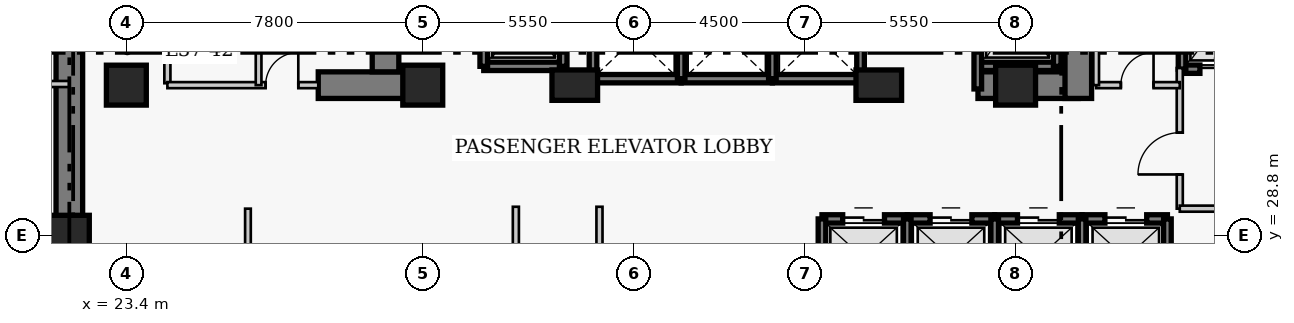
"""IFC4 building model, lengths in metres.
Left out: names, types, materials, properties, quantities, classifications, styles, units other than length and angle.
Written with IfcOpenShell. Run it as: python <this file> out.ifc"""

import sys

from ifc_helpers import new_model, si_unit, direction, frame, frame_2d, origin, origin_2d, place, context, subcontext, project, spatial, rectangle, extrude, element, fill, save


model = new_model("IFC4")
c1 = context("Model", 3, precision=1e-05, world=origin(), true_north=direction((0.0, 1.0)))
c2 = subcontext(c1, "Body", "Model", "MODEL_VIEW")
j1 = project(units=[si_unit("LENGTHUNIT", "METRE"), si_unit("PLANEANGLEUNIT", "RADIAN")], contexts=[c1])
p1 = place(None, origin())
s1 = spatial("IfcSite", under=j1, at=p1, CompositionType="ELEMENT")
p2 = place(p1, origin())
s2 = spatial("IfcBuilding", under=s1, at=p2, CompositionType="ELEMENT")
p3 = place(p2, frame((0.0, 0.0, 149.8)))
s3 = spatial("IfcBuildingStorey", under=s2, at=p3, CompositionType="ELEMENT", Elevation=149.8)
p4 = place(p3, frame((21.9, 27.05, 0.0), z_axis=(0.0, 0.0, 1.0), x_axis=(0.0, 1.0, 0.0)))
e1 = element("IfcWall", 1, at=p4, inside=s3, PredefinedType="SHEAR", context=c2, shape_type="SweptSolid", body=[
    extrude(rectangle(XDim=13.62, YDim=0.7, at=frame_2d((6.81, 0.0))), origin(), (0.0, 0.0, 1.0), 3.8),
])
p5 = place(p3, frame((28.45, 32.75, 0.0), z_axis=(0.0, 0.0, 1.0), x_axis=(1.0, 0.0, 0.0)))
e2 = element("IfcWall", 2, at=p5, inside=s3, PredefinedType="SHEAR", context=c2, shape_type="SweptSolid", body=[
    extrude(rectangle(XDim=2.4, YDim=0.7, at=frame_2d((1.2, 0.0))), origin(), (0.0, 0.0, 1.0), 3.8),
])
p6 = place(p3, frame((45.81, 32.75, 0.0), z_axis=(0.0, 0.0, 1.0), x_axis=(1.0, 0.0, 0.0)))
e3 = element("IfcWall", 3, at=p6, inside=s3, PredefinedType="SHEAR", context=c2, shape_type="SweptSolid", body=[
    extrude(rectangle(XDim=2.64, YDim=0.7, at=frame_2d((1.32, 0.0))), origin(), (0.0, 0.0, 1.0), 3.8),
])
p7 = place(p3, frame((30.22, 33.1, 0.0), z_axis=(0.0, 0.0, 1.0), x_axis=(0.0, 1.0, 0.0)))
e4 = element("IfcWall", 4, at=p7, inside=s3, PredefinedType="SHEAR", context=c2, shape_type="SweptSolid", body=[
    extrude(rectangle(XDim=7.22, YDim=0.7, at=frame_2d((3.61, 0.0))), origin(), (0.0, 0.0, 1.0), 3.8),
])
p8 = place(p3, frame((48.45, 32.4, 0.0), z_axis=(0.0, 0.0, 1.0), x_axis=(0.0, 1.0, 0.0)))
e5 = element("IfcWall", 5, at=p8, inside=s3, PredefinedType="SHEAR", context=c2, shape_type="SweptSolid", body=[
    extrude(rectangle(XDim=7.92, YDim=0.7, at=frame_2d((3.96, 0.0))), origin(), (0.0, 0.0, 1.0), 3.8),
])
p9 = place(p8, frame((5.8, 0.0, 0.0)))
e6 = element("IfcOpeningElement", 6, at=p9, cuts=e5, PredefinedType="OPENING", context=c2, shape_type="SweptSolid", body=[
    extrude(rectangle(XDim=1.1, YDim=2.15, at=frame_2d((0.55, 1.075))), frame((0.0, 0.36, 0.0), z_axis=(0.0, -1.0, 0.0), x_axis=(1.0, 0.0, 0.0)), (0.0, 0.0, 1.0), 0.72),
])
for number, where, z_axis, x_axis in (
    (7, (21.9, 28.8, 0.0), (0.0, 0.0, 1.0), (1.0, 0.0, 0.0)),
    (8, (23.4, 32.75, 0.0), (0.0, 0.0, 1.0), (1.0, 0.0, 0.0)),
    (9, (31.2, 32.75, 0.0), (0.0, 0.0, 1.0), (1.0, 0.0, 0.0)),
):
    element("IfcColumn", number, at=place(p3, frame(where, z_axis=z_axis, x_axis=x_axis)), inside=s3, PredefinedType="COLUMN", context=c2, shape_type="SweptSolid", body=[
        extrude(rectangle(XDim=1.05, YDim=1.05, at=origin_2d()), origin(), (0.0, 0.0, 1.0), 3.8),
    ])
for number, where, z_axis, x_axis in (
    (10, (35.2, 32.75, 0.0), (0.0, 0.0, 1.0), (1.0, 0.0, 0.0)),
    (11, (43.2, 32.75, 0.0), (0.0, 0.0, 1.0), (1.0, 0.0, 0.0)),
):
    element("IfcColumn", number, at=place(p3, frame(where, z_axis=z_axis, x_axis=x_axis)), inside=s3, PredefinedType="COLUMN", context=c2, shape_type="SweptSolid", body=[
        extrude(rectangle(XDim=1.2, YDim=0.8, at=origin_2d()), origin(), (0.0, 0.0, 1.0), 3.8),
    ])
p10 = place(p3, frame((46.8, 32.75, 0.0), z_axis=(0.0, 0.0, 1.0), x_axis=(1.0, 0.0, 0.0)))
e12 = element("IfcColumn", 12, at=p10, inside=s3, PredefinedType="COLUMN", context=c2, shape_type="SweptSolid", body=[
    extrude(rectangle(XDim=1.05, YDim=1.05, at=origin_2d()), origin(), (0.0, 0.0, 1.0), 3.8),
])
p11 = place(p3, frame((41.705, 29.23, 0.0), z_axis=(0.0, 0.0, 1.0), x_axis=(1.0, 0.0, 0.0)))
e13 = element("IfcWall", 13, at=p11, inside=s3, PredefinedType="SHEAR", context=c2, shape_type="SweptSolid", body=[
    extrude(rectangle(XDim=2.245, YDim=0.22, at=frame_2d((1.123, 0.0))), origin(), (0.0, 0.0, 1.0), 3.8),
])
p12 = place(p11, frame((0.545, 0.0, 0.0)))
e14 = element("IfcOpeningElement", 14, at=p12, cuts=e13, PredefinedType="OPENING", context=c2, shape_type="SweptSolid", body=[
    extrude(rectangle(XDim=1.1, YDim=2.15, at=frame_2d((0.55, 1.075))), frame((0.0, 0.12, 0.0), z_axis=(0.0, -1.0, 0.0), x_axis=(1.0, 0.0, 0.0)), (0.0, 0.0, 1.0), 0.24),
])
p13 = place(p3, frame((41.705, 27.17, 0.0), z_axis=(0.0, 0.0, 1.0), x_axis=(0.0, 1.0, 0.0)))
e15 = element("IfcWall", 15, at=p13, inside=s3, PredefinedType="SHEAR", context=c2, shape_type="SweptSolid", body=[
    extrude(rectangle(XDim=2.06, YDim=0.2, at=frame_2d((1.03, 0.0))), origin(), (0.0, 0.0, 1.0), 3.8),
])
p14 = place(p3, frame((43.95, 29.23, 0.0), z_axis=(0.0, 0.0, 1.0), x_axis=(1.0, 0.0, 0.0)))
e16 = element("IfcWall", 16, at=p14, inside=s3, PredefinedType="SHEAR", context=c2, shape_type="SweptSolid", body=[
    extrude(rectangle(XDim=2.3, YDim=0.22, at=frame_2d((1.15, 0.0))), origin(), (0.0, 0.0, 1.0), 3.8),
])
p15 = place(p14, frame((0.6, 0.0, 0.0)))
e17 = element("IfcOpeningElement", 17, at=p15, cuts=e16, PredefinedType="OPENING", context=c2, shape_type="SweptSolid", body=[
    extrude(rectangle(XDim=1.1, YDim=2.15, at=frame_2d((0.55, 1.075))), frame((0.0, 0.12, 0.0), z_axis=(0.0, -1.0, 0.0), x_axis=(1.0, 0.0, 0.0)), (0.0, 0.0, 1.0), 0.24),
])
p16 = place(p3, frame((43.95, 27.17, 0.0), z_axis=(0.0, 0.0, 1.0), x_axis=(0.0, 1.0, 0.0)))
e18 = element("IfcWall", 18, at=p16, inside=s3, PredefinedType="SHEAR", context=c2, shape_type="SweptSolid", body=[
    extrude(rectangle(XDim=2.06, YDim=0.2, at=frame_2d((1.03, 0.0))), origin(), (0.0, 0.0, 1.0), 3.8),
])
p17 = place(p3, frame((46.25, 29.23, 0.0), z_axis=(0.0, 0.0, 1.0), x_axis=(1.0, 0.0, 0.0)))
e19 = element("IfcWall", 19, at=p17, inside=s3, PredefinedType="SHEAR", context=c2, shape_type="SweptSolid", body=[
    extrude(rectangle(XDim=2.3, YDim=0.22, at=frame_2d((1.15, 0.0))), origin(), (0.0, 0.0, 1.0), 3.8),
])
p18 = place(p17, frame((0.6, 0.0, 0.0)))
e20 = element("IfcOpeningElement", 20, at=p18, cuts=e19, PredefinedType="OPENING", context=c2, shape_type="SweptSolid", body=[
    extrude(rectangle(XDim=1.1, YDim=2.15, at=frame_2d((0.55, 1.075))), frame((0.0, 0.12, 0.0), z_axis=(0.0, -1.0, 0.0), x_axis=(1.0, 0.0, 0.0)), (0.0, 0.0, 1.0), 0.24),
])
p19 = place(p3, frame((46.25, 27.17, 0.0), z_axis=(0.0, 0.0, 1.0), x_axis=(0.0, 1.0, 0.0)))
e21 = element("IfcWall", 21, at=p19, inside=s3, PredefinedType="SHEAR", context=c2, shape_type="SweptSolid", body=[
    extrude(rectangle(XDim=2.06, YDim=0.2, at=frame_2d((1.03, 0.0))), origin(), (0.0, 0.0, 1.0), 3.8),
])
p20 = place(p3, frame((48.55, 29.23, 0.0), z_axis=(0.0, 0.0, 1.0), x_axis=(1.0, 0.0, 0.0)))
e22 = element("IfcWall", 22, at=p20, inside=s3, PredefinedType="SHEAR", context=c2, shape_type="SweptSolid", body=[
    extrude(rectangle(XDim=2.245, YDim=0.22, at=frame_2d((1.123, 0.0))), origin(), (0.0, 0.0, 1.0), 3.8),
])
p21 = place(p20, frame((0.6, 0.0, 0.0)))
e23 = element("IfcOpeningElement", 23, at=p21, cuts=e22, PredefinedType="OPENING", context=c2, shape_type="SweptSolid", body=[
    extrude(rectangle(XDim=1.1, YDim=2.15, at=frame_2d((0.55, 1.075))), frame((0.0, 0.12, 0.0), z_axis=(0.0, -1.0, 0.0), x_axis=(1.0, 0.0, 0.0)), (0.0, 0.0, 1.0), 0.24),
])
for number, where, z_axis, x_axis in (
    (24, (48.55, 27.17, 0.0), (0.0, 0.0, 1.0), (0.0, 1.0, 0.0)),
    (25, (50.795, 27.17, 0.0), (0.0, 0.0, 1.0), (0.0, 1.0, 0.0)),
):
    element("IfcWall", number, at=place(p3, frame(where, z_axis=z_axis, x_axis=x_axis)), inside=s3, PredefinedType="SHEAR", context=c2, shape_type="SweptSolid", body=[
        extrude(rectangle(XDim=2.06, YDim=0.2, at=frame_2d((1.03, 0.0))), origin(), (0.0, 0.0, 1.0), 3.8),
    ])
p22 = place(p3, frame((35.68, 32.92, 0.0), z_axis=(0.0, 0.0, 1.0), x_axis=(1.0, 0.0, 0.0)))
e26 = element("IfcWall", 26, at=p22, inside=s3, PredefinedType="SHEAR", context=c2, shape_type="SweptSolid", body=[
    extrude(rectangle(XDim=2.32, YDim=0.22, at=frame_2d((1.16, 0.0))), origin(), (0.0, 0.0, 1.0), 3.8),
])
p23 = place(p3, frame((35.68, 32.92, 0.0), z_axis=(0.0, 0.0, 1.0), x_axis=(0.0, 1.0, 0.0)))
e27 = element("IfcWall", 27, at=p23, inside=s3, PredefinedType="SHEAR", context=c2, shape_type="SweptSolid", body=[
    extrude(rectangle(XDim=2.16, YDim=0.2, at=frame_2d((1.08, 0.0))), origin(), (0.0, 0.0, 1.0), 3.8),
])
p24 = place(p3, frame((38.0, 32.92, 0.0), z_axis=(0.0, 0.0, 1.0), x_axis=(1.0, 0.0, 0.0)))
e28 = element("IfcWall", 28, at=p24, inside=s3, PredefinedType="SHEAR", context=c2, shape_type="SweptSolid", body=[
    extrude(rectangle(XDim=2.4, YDim=0.22, at=frame_2d((1.2, 0.0))), origin(), (0.0, 0.0, 1.0), 3.8),
])
p25 = place(p3, frame((38.0, 32.92, 0.0), z_axis=(0.0, 0.0, 1.0), x_axis=(0.0, 1.0, 0.0)))
e29 = element("IfcWall", 29, at=p25, inside=s3, PredefinedType="SHEAR", context=c2, shape_type="SweptSolid", body=[
    extrude(rectangle(XDim=2.16, YDim=0.2, at=frame_2d((1.08, 0.0))), origin(), (0.0, 0.0, 1.0), 3.8),
])
p26 = place(p3, frame((40.4, 32.92, 0.0), z_axis=(0.0, 0.0, 1.0), x_axis=(1.0, 0.0, 0.0)))
e30 = element("IfcWall", 30, at=p26, inside=s3, PredefinedType="SHEAR", context=c2, shape_type="SweptSolid", body=[
    extrude(rectangle(XDim=2.32, YDim=0.22, at=frame_2d((1.16, 0.0))), origin(), (0.0, 0.0, 1.0), 3.8),
])
for number, where, z_axis, x_axis in (
    (31, (40.4, 32.92, 0.0), (0.0, 0.0, 1.0), (0.0, 1.0, 0.0)),
    (32, (42.72, 32.92, 0.0), (0.0, 0.0, 1.0), (0.0, 1.0, 0.0)),
):
    element("IfcWall", number, at=place(p3, frame(where, z_axis=z_axis, x_axis=x_axis)), inside=s3, PredefinedType="SHEAR", context=c2, shape_type="SweptSolid", body=[
        extrude(rectangle(XDim=2.16, YDim=0.2, at=frame_2d((1.08, 0.0))), origin(), (0.0, 0.0, 1.0), 3.8),
    ])
p27 = place(p3, frame((51.18, 33.17, 0.0), z_axis=(0.0, 0.0, 1.0), x_axis=(1.0, 0.0, 0.0)))
e33 = element("IfcWall", 33, at=p27, inside=s3, PredefinedType="SHEAR", context=c2, shape_type="SweptSolid", body=[
    extrude(rectangle(XDim=2.42, YDim=0.22, at=frame_2d((1.21, 0.0))), origin(), (0.0, 0.0, 1.0), 3.8),
])
p28 = place(p27, frame((0.47, 0.0, 0.0)))
e34 = element("IfcOpeningElement", 34, at=p28, cuts=e33, PredefinedType="OPENING", context=c2, shape_type="SweptSolid", body=[
    extrude(rectangle(XDim=1.3, YDim=2.15, at=frame_2d((0.65, 1.075))), frame((0.0, 0.12, 0.0), z_axis=(0.0, -1.0, 0.0), x_axis=(1.0, 0.0, 0.0)), (0.0, 0.0, 1.0), 0.24),
])
p29 = place(p3, frame((51.18, 33.17, 0.0), z_axis=(0.0, 0.0, 1.0), x_axis=(0.0, 1.0, 0.0)))
e35 = element("IfcWall", 35, at=p29, inside=s3, PredefinedType="SHEAR", context=c2, shape_type="SweptSolid", body=[
    extrude(rectangle(XDim=2.86, YDim=0.2, at=frame_2d((1.43, 0.0))), origin(), (0.0, 0.0, 1.0), 3.8),
])
p30 = place(p3, frame((32.805, 33.245, 0.0), z_axis=(0.0, 0.0, 1.0), x_axis=(1.0, 0.0, 0.0)))
e36 = element("IfcWall", 36, at=p30, inside=s3, PredefinedType="SHEAR", context=c2, shape_type="SweptSolid", body=[
    extrude(rectangle(XDim=2.09, YDim=0.22, at=frame_2d((1.045, 0.0))), origin(), (0.0, 0.0, 1.0), 3.8),
])
for number, where, z_axis, x_axis in (
    (37, (32.805, 33.245, 0.0), (0.0, 0.0, 1.0), (0.0, 1.0, 0.0)),
    (38, (34.895, 33.245, 0.0), (0.0, 0.0, 1.0), (0.0, 1.0, 0.0)),
):
    element("IfcWall", number, at=place(p3, frame(where, z_axis=z_axis, x_axis=x_axis)), inside=s3, PredefinedType="SHEAR", context=c2, shape_type="SweptSolid", body=[
        extrude(rectangle(XDim=2.91, YDim=0.2, at=frame_2d((1.455, 0.0))), origin(), (0.0, 0.0, 1.0), 3.8),
    ])
p31 = place(p3, frame((45.805, 33.245, 0.0), z_axis=(0.0, 0.0, 1.0), x_axis=(1.0, 0.0, 0.0)))
e39 = element("IfcWall", 39, at=p31, inside=s3, PredefinedType="SHEAR", context=c2, shape_type="SweptSolid", body=[
    extrude(rectangle(XDim=2.09, YDim=0.22, at=frame_2d((1.045, 0.0))), origin(), (0.0, 0.0, 1.0), 3.8),
])
p32 = place(p3, frame((45.805, 32.65, 0.0), z_axis=(0.0, 0.0, 1.0), x_axis=(0.0, 1.0, 0.0)))
e40 = element("IfcWall", 40, at=p32, inside=s3, PredefinedType="SHEAR", context=c2, shape_type="SweptSolid", body=[
    extrude(rectangle(XDim=3.505, YDim=0.2, at=frame_2d((1.752, 0.0))), origin(), (0.0, 0.0, 1.0), 3.8),
])
p33 = place(p3, frame((47.895, 33.245, 0.0), z_axis=(0.0, 0.0, 1.0), x_axis=(0.0, 1.0, 0.0)))
e41 = element("IfcWall", 41, at=p33, inside=s3, PredefinedType="SHEAR", context=c2, shape_type="SweptSolid", body=[
    extrude(rectangle(XDim=2.91, YDim=0.2, at=frame_2d((1.455, 0.0))), origin(), (0.0, 0.0, 1.0), 3.8),
])
p34 = place(p3, frame((24.48, 32.8, 0.0), z_axis=(0.0, 0.0, 1.0), x_axis=(0.0, 1.0, 0.0)))
e42 = element("IfcWall", 42, at=p34, inside=s3, PredefinedType="PARTITIONING", context=c2, shape_type="SweptSolid", body=[
    extrude(rectangle(XDim=3.57, YDim=0.16, at=frame_2d((1.785, 0.0))), origin(), (0.0, 0.0, 1.0), 3.55),
])
p35 = place(p34, frame((1.604, 0.0, 0.0)))
e43 = element("IfcOpeningElement", 43, at=p35, cuts=e42, PredefinedType="OPENING", context=c2, shape_type="SweptSolid", body=[
    extrude(rectangle(XDim=0.9, YDim=2.1, at=frame_2d((0.45, 1.05))), frame((0.0, 0.09, 0.0), z_axis=(0.0, -1.0, 0.0), x_axis=(1.0, 0.0, 0.0)), (0.0, 0.0, 1.0), 0.18),
])
p36 = place(p3, frame((51.12, 29.5, 0.0), z_axis=(0.0, 0.0, 1.0), x_axis=(0.0, 1.0, 0.0)))
e44 = element("IfcWall", 44, at=p36, inside=s3, PredefinedType="PARTITIONING", context=c2, shape_type="SweptSolid", body=[
    extrude(rectangle(XDim=3.7, YDim=0.16, at=frame_2d((1.85, 0.0))), origin(), (0.0, 0.0, 1.0), 3.55),
])
p37 = place(p36, frame((0.9, 0.0, 0.0)))
e45 = element("IfcOpeningElement", 45, at=p37, cuts=e44, PredefinedType="OPENING", context=c2, shape_type="SweptSolid", body=[
    extrude(rectangle(XDim=1.1, YDim=2.15, at=frame_2d((0.55, 1.075))), frame((0.0, 0.09, 0.0), z_axis=(0.0, -1.0, 0.0), x_axis=(1.0, 0.0, 0.0)), (0.0, 0.0, 1.0), 0.18),
])
p38 = place(p3, frame((51.12, 29.5, 0.0), z_axis=(0.0, 0.0, 1.0), x_axis=(1.0, 0.0, 0.0)))
e46 = element("IfcWall", 46, at=p38, inside=s3, PredefinedType="PARTITIONING", context=c2, shape_type="SweptSolid", body=[
    extrude(rectangle(XDim=5.63, YDim=0.16, at=frame_2d((2.815, 0.0))), origin(), (0.0, 0.0, 1.0), 3.55),
])
p39 = place(p3, frame((24.48, 32.75, 0.0), z_axis=(0.0, 0.0, 1.0), x_axis=(1.0, 0.0, 0.0)))
e47 = element("IfcWall", 47, at=p39, inside=s3, PredefinedType="PARTITIONING", context=c2, shape_type="SweptSolid", body=[
    extrude(rectangle(XDim=3.97, YDim=0.16, at=frame_2d((1.985, 0.0))), origin(), (0.0, 0.0, 1.0), 3.55),
])
p40 = place(p39, frame((2.585, 0.0, 0.0)))
e48 = element("IfcOpeningElement", 48, at=p40, cuts=e47, PredefinedType="OPENING", context=c2, shape_type="SweptSolid", body=[
    extrude(rectangle(XDim=0.86, YDim=2.05, at=frame_2d((0.43, 1.025))), frame((0.0, 0.09, 0.0), z_axis=(0.0, -1.0, 0.0), x_axis=(1.0, 0.0, 0.0)), (0.0, 0.0, 1.0), 0.18),
])
p41 = place(p3, frame((48.92, 32.75, 0.0), z_axis=(0.0, 0.0, 1.0), x_axis=(1.0, 0.0, 0.0)))
e49 = element("IfcWall", 49, at=p41, inside=s3, PredefinedType="PARTITIONING", context=c2, shape_type="SweptSolid", body=[
    extrude(rectangle(XDim=2.2, YDim=0.16, at=frame_2d((1.1, 0.0))), origin(), (0.0, 0.0, 1.0), 3.55),
])
p42 = place(p41, frame((0.65, 0.0, 0.0)))
e50 = element("IfcOpeningElement", 50, at=p42, cuts=e49, PredefinedType="OPENING", context=c2, shape_type="SweptSolid", body=[
    extrude(rectangle(XDim=0.86, YDim=2.05, at=frame_2d((0.43, 1.025))), frame((0.0, 0.09, 0.0), z_axis=(0.0, -1.0, 0.0), x_axis=(1.0, 0.0, 0.0)), (0.0, 0.0, 1.0), 0.18),
])
for number, where, z_axis, x_axis in (
    (51, (48.92, 32.75, 0.0), (0.0, 0.0, 1.0), (0.0, 1.0, 0.0)),
    (52, (26.88, 32.75, 0.0), (0.0, 0.0, 1.0), (0.0, 1.0, 0.0)),
):
    element("IfcWall", number, at=place(p3, frame(where, z_axis=z_axis, x_axis=x_axis)), inside=s3, PredefinedType="PARTITIONING", context=c2, shape_type="SweptSolid", body=[
        extrude(rectangle(XDim=3.62, YDim=0.15, at=frame_2d((1.81, 0.0))), origin(), (0.0, 0.0, 1.0), 3.55),
    ])
for number, where, z_axis, x_axis in (
    (53, (33.65, 17.96, 0.0), (0.0, 0.0, 1.0), (0.0, 1.0, 0.0)),
    (54, (35.85, 17.96, 0.0), (0.0, 0.0, 1.0), (0.0, 1.0, 0.0)),
):
    element("IfcWall", number, at=place(p3, frame(where, z_axis=z_axis, x_axis=x_axis)), inside=s3, PredefinedType="PARTITIONING", context=c2, shape_type="SweptSolid", body=[
        extrude(rectangle(XDim=11.59, YDim=0.16, at=frame_2d((5.795, 0.0))), origin(), (0.0, 0.0, 1.0), 3.55),
    ])
p43 = place(p3, frame((18.86, 32.78, 0.0), z_axis=(0.0, 0.0, 1.0), x_axis=(1.0, 0.0, 0.0)))
e55 = element("IfcWall", 55, at=p43, inside=s3, PredefinedType="PARTITIONING", context=c2, shape_type="SweptSolid", body=[
    extrude(rectangle(XDim=3.04, YDim=0.16, at=frame_2d((1.52, 0.0))), origin(), (0.0, 0.0, 1.0), 3.55),
])
p44 = place(p3, frame((26.6, 17.96, 0.0), z_axis=(0.0, 0.0, 1.0), x_axis=(0.0, 1.0, 0.0)))
e56 = element("IfcWall", 56, at=p44, inside=s3, PredefinedType="PARTITIONING", context=c2, shape_type="SweptSolid", body=[
    extrude(rectangle(XDim=11.54, YDim=0.15, at=frame_2d((5.77, 0.0))), origin(), (0.0, 0.0, 1.0), 3.55),
])
p45 = place(p12, origin())
e57 = element("IfcDoor", 57, at=p45, inside=s3, OperationType="DOUBLE_DOOR_SLIDING", PredefinedType="DOOR", context=c2, shape_type="SweptSolid", body=[
    extrude(rectangle(XDim=1.1, YDim=2.15, at=frame_2d((0.55, 1.075))), frame((0.0, 0.025, 0.0), z_axis=(0.0, -1.0, 0.0), x_axis=(1.0, 0.0, 0.0)), (0.0, 0.0, 1.0), 0.05),
])
fill(e14, e57)
p46 = place(p15, origin())
e58 = element("IfcDoor", 58, at=p46, inside=s3, OperationType="DOUBLE_DOOR_SLIDING", PredefinedType="DOOR", context=c2, shape_type="SweptSolid", body=[
    extrude(rectangle(XDim=1.1, YDim=2.15, at=frame_2d((0.55, 1.075))), frame((0.0, 0.025, 0.0), z_axis=(0.0, -1.0, 0.0), x_axis=(1.0, 0.0, 0.0)), (0.0, 0.0, 1.0), 0.05),
])
fill(e17, e58)
p47 = place(p18, origin())
e59 = element("IfcDoor", 59, at=p47, inside=s3, OperationType="DOUBLE_DOOR_SLIDING", PredefinedType="DOOR", context=c2, shape_type="SweptSolid", body=[
    extrude(rectangle(XDim=1.1, YDim=2.15, at=frame_2d((0.55, 1.075))), frame((0.0, 0.025, 0.0), z_axis=(0.0, -1.0, 0.0), x_axis=(1.0, 0.0, 0.0)), (0.0, 0.0, 1.0), 0.05),
])
fill(e20, e59)
p48 = place(p21, origin())
e60 = element("IfcDoor", 60, at=p48, inside=s3, OperationType="DOUBLE_DOOR_SLIDING", PredefinedType="DOOR", context=c2, shape_type="SweptSolid", body=[
    extrude(rectangle(XDim=1.1, YDim=2.15, at=frame_2d((0.55, 1.075))), frame((0.0, 0.025, 0.0), z_axis=(0.0, -1.0, 0.0), x_axis=(1.0, 0.0, 0.0)), (0.0, 0.0, 1.0), 0.05),
])
fill(e23, e60)
p49 = place(p28, origin())
e61 = element("IfcDoor", 61, at=p49, inside=s3, OperationType="DOUBLE_DOOR_SLIDING", PredefinedType="DOOR", context=c2, shape_type="SweptSolid", body=[
    extrude(rectangle(XDim=1.3, YDim=2.15, at=frame_2d((0.65, 1.075))), frame((0.0, 0.025, 0.0), z_axis=(0.0, -1.0, 0.0), x_axis=(1.0, 0.0, 0.0)), (0.0, 0.0, 1.0), 0.05),
])
fill(e34, e61)
p50 = place(p37, origin())
e62 = element("IfcDoor", 62, at=p50, inside=s3, OperationType="SINGLE_SWING_LEFT", PredefinedType="DOOR", context=c2, shape_type="SweptSolid", body=[
    extrude(rectangle(XDim=1.1, YDim=2.15, at=frame_2d((0.55, 1.075))), frame((0.0, 0.025, 0.0), z_axis=(0.0, -1.0, 0.0), x_axis=(1.0, 0.0, 0.0)), (0.0, 0.0, 1.0), 0.05),
])
fill(e45, e62)
p51 = place(p40, origin())
e63 = element("IfcDoor", 63, at=p51, inside=s3, OperationType="SINGLE_SWING_RIGHT", PredefinedType="DOOR", context=c2, shape_type="SweptSolid", body=[
    extrude(rectangle(XDim=0.86, YDim=2.05, at=frame_2d((0.43, 1.025))), frame((0.0, 0.025, 0.0), z_axis=(0.0, -1.0, 0.0), x_axis=(1.0, 0.0, 0.0)), (0.0, 0.0, 1.0), 0.05),
])
fill(e48, e63)
p52 = place(p42, origin())
e64 = element("IfcDoor", 64, at=p52, inside=s3, OperationType="SINGLE_SWING_RIGHT", PredefinedType="DOOR", context=c2, shape_type="SweptSolid", body=[
    extrude(rectangle(XDim=0.86, YDim=2.05, at=frame_2d((0.43, 1.025))), frame((0.0, 0.025, 0.0), z_axis=(0.0, -1.0, 0.0), x_axis=(1.0, 0.0, 0.0)), (0.0, 0.0, 1.0), 0.05),
])
fill(e50, e64)
save(model, sys.argv[1])
